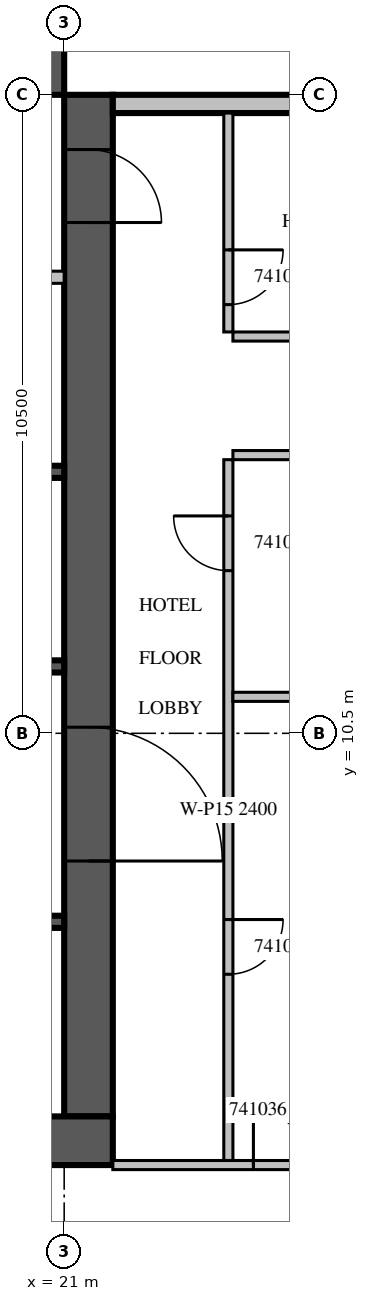
"""IFC4 building model, lengths in metres.
Left out: names, types, materials, properties, quantities, classifications, styles, units other than length and angle.
Written with IfcOpenShell. Run it as: python <this file> out.ifc"""

import sys

from ifc_helpers import new_model, si_unit, direction, frame, frame_2d, origin, place, context, subcontext, project, spatial, rectangle, extrude, source, transform, mapped, element, fill, save


model = new_model("IFC4")
c1 = context("Model", 3, precision=1e-05, world=origin(), true_north=direction((0.0, 1.0)))
c2 = subcontext(c1, "Body", "Model", "MODEL_VIEW")
j1 = project(units=[si_unit("LENGTHUNIT", "METRE"), si_unit("PLANEANGLEUNIT", "RADIAN")], contexts=[c1])
p1 = place(None, origin())
s1 = spatial("IfcSite", under=j1, at=p1, CompositionType="ELEMENT")
p2 = place(p1, origin())
s2 = spatial("IfcBuilding", under=s1, at=p2, CompositionType="ELEMENT")
p3 = place(p2, frame((0.0, 0.0, 189.2)))
s3 = spatial("IfcBuildingStorey", under=s2, at=p3, CompositionType="ELEMENT", Elevation=189.2)
m1 = source(origin(), c2, "Body", "SweptSolid", [
    extrude(rectangle(XDim=16.8, YDim=0.8, at=frame_2d((8.4, 0.0))), origin(), (0.0, 0.0, 1.0), 3.8),
])
p4 = place(p3, frame((21.4, 4.2, 0.0), z_axis=(0.0, 0.0, 1.0), x_axis=(0.0, 1.0, 0.0)))
e1 = element("IfcWall", 1, at=p4, inside=s3, PredefinedType="SHEAR", context=c2, shape_type="MappedRepresentation", body=[
    mapped(m1, transform((0.0, 0.0, 0.0), scale=1.0)),
])
m2 = source(origin(), c2, "Body", "SweptSolid", [
    extrude(rectangle(XDim=2.2, YDim=2.1, at=frame_2d((1.1, 1.05))), frame((0.0, 0.41, 0.0), z_axis=(0.0, -1.0, 0.0), x_axis=(1.0, 0.0, 0.0)), (0.0, 0.0, 1.0), 0.82),
])
p5 = place(p4, frame((4.2, 0.0, 0.0)))
e2 = element("IfcOpeningElement", 2, at=p5, cuts=e1, PredefinedType="OPENING", context=c2, shape_type="MappedRepresentation", body=[
    mapped(m2, transform((0.0, 0.0, 0.0), scale=1.0)),
])
m3 = source(origin(), c2, "Body", "SweptSolid", [
    extrude(rectangle(XDim=1.2, YDim=2.1, at=frame_2d((0.6, 1.05))), frame((0.0, 0.41, 0.0), z_axis=(0.0, -1.0, 0.0), x_axis=(1.0, 0.0, 0.0)), (0.0, 0.0, 1.0), 0.82),
])
p6 = place(p4, frame((14.7, 0.0, 0.0)))
e3 = element("IfcOpeningElement", 3, at=p6, cuts=e1, PredefinedType="OPENING", context=c2, shape_type="MappedRepresentation", body=[
    mapped(m3, transform((0.0, 0.0, 0.0), scale=1.0)),
])
m4 = source(origin(), c2, "Body", "SweptSolid", [
    extrude(rectangle(XDim=17.6, YDim=0.8, at=frame_2d((8.8, 0.0))), origin(), (0.0, 0.0, 1.0), 3.8),
])
p7 = place(p3, frame((4.2, 3.8, 0.0), z_axis=(0.0, 0.0, 1.0), x_axis=(1.0, 0.0, 0.0)))
e4 = element("IfcWall", 4, at=p7, inside=s3, PredefinedType="SHEAR", context=c2, shape_type="MappedRepresentation", body=[
    mapped(m4, transform((0.0, 0.0, 0.0), scale=1.0)),
])
m5 = source(origin(), c2, "Body", "SweptSolid", [
    extrude(rectangle(XDim=0.9, YDim=2.1, at=frame_2d((0.45, 1.05))), frame((0.0, 0.41, 0.0), z_axis=(0.0, -1.0, 0.0), x_axis=(1.0, 0.0, 0.0)), (0.0, 0.0, 1.0), 0.82),
])
p8 = place(p7, frame((11.55, 0.0, 0.0)))
e5 = element("IfcOpeningElement", 5, at=p8, cuts=e4, PredefinedType="OPENING", context=c2, shape_type="MappedRepresentation", body=[
    mapped(m5, transform((0.0, 0.0, 0.0), scale=1.0)),
])
p9 = place(p3, frame((4.2, 21.4, 0.0), z_axis=(0.0, 0.0, 1.0), x_axis=(1.0, 0.0, 0.0)))
e6 = element("IfcWall", 6, at=p9, inside=s3, PredefinedType="SHEAR", context=c2, shape_type="MappedRepresentation", body=[
    mapped(m1, transform((0.0, 0.0, 0.0), scale=1.0)),
])
p10 = place(p9, frame((7.4, 0.0, 0.0)))
e7 = element("IfcOpeningElement", 7, at=p10, cuts=e6, PredefinedType="OPENING", context=c2, shape_type="MappedRepresentation", body=[
    mapped(m3, transform((0.0, 0.0, 0.0), scale=1.0)),
])
m6 = source(origin(), c2, "Body", "SweptSolid", [
    extrude(rectangle(XDim=7.15, YDim=0.3, at=frame_2d((3.575, 0.0))), origin(), (0.0, 0.0, 1.0), 3.4),
])
p11 = place(p3, frame((28.95, 20.85, 0.0), z_axis=(0.0, 0.0, 1.0), x_axis=(-1.0, 0.0, 0.0)))
e8 = element("IfcWall", 8, at=p11, inside=s3, PredefinedType="STANDARD", context=c2, shape_type="MappedRepresentation", body=[
    mapped(m6, transform((0.0, 0.0, 0.0), scale=1.0)),
])
m7 = source(origin(), c2, "Body", "SweptSolid", [
    extrude(rectangle(XDim=3.0, YDim=2.3, at=frame_2d((1.5, 1.15))), frame((0.0, 0.16, 0.0), z_axis=(0.0, -1.0, 0.0), x_axis=(1.0, 0.0, 0.0)), (0.0, 0.0, 1.0), 0.32),
])
p12 = place(p11, frame((0.15, 0.0, 0.6)))
e9 = element("IfcOpeningElement", 9, at=p12, cuts=e8, PredefinedType="OPENING", context=c2, shape_type="MappedRepresentation", body=[
    mapped(m7, transform((0.0, 0.0, 0.0), scale=1.0)),
])
m8 = source(origin(), c2, "Body", "SweptSolid", [
    extrude(rectangle(XDim=2.4, YDim=0.2, at=frame_2d((1.2, 0.0))), origin(), (0.0, 0.0, 1.0), 3.8),
])
p13 = place(p3, frame((18.6, 7.4, 0.0), z_axis=(0.0, 0.0, 1.0), x_axis=(1.0, 0.0, 0.0)))
e10 = element("IfcWall", 10, at=p13, inside=s3, PredefinedType="SOLIDWALL", context=c2, shape_type="MappedRepresentation", body=[
    mapped(m8, transform((0.0, 0.0, 0.0), scale=1.0)),
])
m9 = source(origin(), c2, "Body", "SweptSolid", [
    extrude(rectangle(XDim=9.6, YDim=0.2, at=frame_2d((4.8, 0.0))), origin(), (0.0, 0.0, 1.0), 3.8),
])
p14 = place(p3, frame((11.4, 11.6, 0.0), z_axis=(0.0, 0.0, 1.0), x_axis=(1.0, 0.0, 0.0)))
e11 = element("IfcWall", 11, at=p14, inside=s3, PredefinedType="SOLIDWALL", context=c2, shape_type="MappedRepresentation", body=[
    mapped(m9, transform((0.0, 0.0, 0.0), scale=1.0)),
])
p15 = place(p3, frame((11.4, 14.8, 0.0), z_axis=(0.0, 0.0, 1.0), x_axis=(1.0, 0.0, 0.0)))
e12 = element("IfcWall", 12, at=p15, inside=s3, PredefinedType="SOLIDWALL", context=c2, shape_type="MappedRepresentation", body=[
    mapped(m9, transform((0.0, 0.0, 0.0), scale=1.0)),
])
m10 = source(origin(), c2, "Body", "SweptSolid", [
    extrude(rectangle(XDim=1.1, YDim=2.1, at=frame_2d((0.55, 1.05))), frame((0.0, 0.11, 0.0), z_axis=(0.0, -1.0, 0.0), x_axis=(1.0, 0.0, 0.0)), (0.0, 0.0, 1.0), 0.22),
])
p16 = place(p15, frame((3.05, 0.0, 0.0)))
e13 = element("IfcOpeningElement", 13, at=p16, cuts=e12, PredefinedType="OPENING", context=c2, shape_type="MappedRepresentation", body=[
    mapped(m10, transform((0.0, 0.0, 0.0), scale=1.0)),
])
p17 = place(p15, frame((5.45, 0.0, 0.0)))
e14 = element("IfcOpeningElement", 14, at=p17, cuts=e12, PredefinedType="OPENING", context=c2, shape_type="MappedRepresentation", body=[
    mapped(m10, transform((0.0, 0.0, 0.0), scale=1.0)),
])
p18 = place(p15, frame((7.85, 0.0, 0.0)))
e15 = element("IfcOpeningElement", 15, at=p18, cuts=e12, PredefinedType="OPENING", context=c2, shape_type="MappedRepresentation", body=[
    mapped(m10, transform((0.0, 0.0, 0.0), scale=1.0)),
])
m11 = source(origin(), c2, "Body", "SweptSolid", [
    extrude(rectangle(XDim=11.45, YDim=0.2, at=frame_2d((5.725, 0.0))), origin(), (0.0, 0.0, 1.0), 3.4),
])
p19 = place(p3, frame((9.55, 18.0, 0.0), z_axis=(0.0, 0.0, 1.0), x_axis=(1.0, 0.0, 0.0)))
e16 = element("IfcWall", 16, at=p19, inside=s3, PredefinedType="PARTITIONING", context=c2, shape_type="MappedRepresentation", body=[
    mapped(m11, transform((0.0, 0.0, 0.0), scale=1.0)),
])
m12 = source(origin(), c2, "Body", "SweptSolid", [
    extrude(rectangle(XDim=0.9, YDim=2.1, at=frame_2d((0.45, 1.05))), frame((0.0, 0.11, 0.0), z_axis=(0.0, -1.0, 0.0), x_axis=(1.0, 0.0, 0.0)), (0.0, 0.0, 1.0), 0.22),
])
p20 = place(p19, frame((1.075, 0.0, 0.0)))
e17 = element("IfcOpeningElement", 17, at=p20, cuts=e16, PredefinedType="OPENING", context=c2, shape_type="MappedRepresentation", body=[
    mapped(m12, transform((0.0, 0.0, 0.0), scale=1.0)),
])
p21 = place(p19, frame((3.125, 0.0, 0.0)))
e18 = element("IfcOpeningElement", 18, at=p21, cuts=e16, PredefinedType="OPENING", context=c2, shape_type="MappedRepresentation", body=[
    mapped(m12, transform((0.0, 0.0, 0.0), scale=1.0)),
])
p22 = place(p19, frame((7.35, 0.0, 0.0)))
e19 = element("IfcOpeningElement", 19, at=p22, cuts=e16, PredefinedType="OPENING", context=c2, shape_type="MappedRepresentation", body=[
    mapped(m10, transform((0.0, 0.0, 0.0), scale=1.0)),
])
m13 = source(origin(), c2, "Body", "SweptSolid", [
    extrude(rectangle(XDim=11.525, YDim=0.15, at=frame_2d((5.763, 0.0))), origin(), (0.0, 0.0, 1.0), 2.4),
])
p23 = place(p3, frame((23.7, 15.0, 0.0), z_axis=(0.0, 0.0, 1.0), x_axis=(0.0, -1.0, 0.0)))
e20 = element("IfcWall", 20, at=p23, inside=s3, PredefinedType="PARTITIONING", context=c2, shape_type="MappedRepresentation", body=[
    mapped(m13, transform((0.0, 0.0, 0.0), scale=1.0)),
])
m14 = source(origin(), c2, "Body", "SweptSolid", [
    extrude(rectangle(XDim=0.9, YDim=2.1, at=frame_2d((0.45, 1.05))), frame((0.0, 0.085, 0.0), z_axis=(0.0, -1.0, 0.0), x_axis=(1.0, 0.0, 0.0)), (0.0, 0.0, 1.0), 0.17),
])
p24 = place(p23, frame((7.562, 0.0, 0.0)))
e21 = element("IfcOpeningElement", 21, at=p24, cuts=e20, PredefinedType="OPENING", context=c2, shape_type="MappedRepresentation", body=[
    mapped(m14, transform((0.0, 0.0, 0.0), scale=1.0)),
])
p25 = place(p23, frame((0.925, 0.0, 0.0)))
e22 = element("IfcOpeningElement", 22, at=p25, cuts=e20, PredefinedType="OPENING", context=c2, shape_type="MappedRepresentation", body=[
    mapped(m14, transform((0.0, 0.0, 0.0), scale=1.0)),
])
m15 = source(origin(), c2, "Body", "SweptSolid", [
    extrude(rectangle(XDim=3.6, YDim=0.15, at=frame_2d((1.8, 0.0))), origin(), (0.0, 0.0, 1.0), 3.4),
])
p26 = place(p3, frame((23.7, 20.7, 0.0), z_axis=(0.0, 0.0, 1.0), x_axis=(0.0, -1.0, 0.0)))
e23 = element("IfcWall", 23, at=p26, inside=s3, PredefinedType="PARTITIONING", context=c2, shape_type="MappedRepresentation", body=[
    mapped(m15, transform((0.0, 0.0, 0.0), scale=1.0)),
])
p27 = place(p26, frame((2.25, 0.0, 0.0)))
e24 = element("IfcOpeningElement", 24, at=p27, cuts=e23, PredefinedType="OPENING", context=c2, shape_type="MappedRepresentation", body=[
    mapped(m14, transform((0.0, 0.0, 0.0), scale=1.0)),
])
m16 = source(origin(), c2, "Body", "SweptSolid", [
    extrude(rectangle(XDim=5.55, YDim=0.15, at=frame_2d((2.775, 0.0))), origin(), (0.0, 0.0, 1.0), 3.4),
])
for number, where, z_axis, x_axis in (
    (25, (29.325, 11.1, 0.0), (0.0, 0.0, 1.0), (-1.0, 0.0, 0.0)),
    (26, (29.325, 15.075, 0.0), (0.0, 0.0, 1.0), (-1.0, 0.0, 0.0)),
    (27, (23.775, 17.025, 0.0), (0.0, 0.0, 1.0), (1.0, 0.0, 0.0)),
):
    element("IfcWall", number, at=place(p3, frame(where, z_axis=z_axis, x_axis=x_axis)), inside=s3, PredefinedType="PARTITIONING", context=c2, shape_type="MappedRepresentation", body=[
        mapped(m16, transform((0.0, 0.0, 0.0), scale=1.0)),
    ])
m17 = source(origin(), c2, "Body", "SweptSolid", [
    extrude(rectangle(XDim=7.525, YDim=0.15, at=frame_2d((3.763, 0.0))), origin(), (0.0, 0.0, 1.0), 2.9),
])
p28 = place(p3, frame((21.8, 3.4, 0.0), z_axis=(0.0, 0.0, 1.0), x_axis=(1.0, 0.0, 0.0)))
e28 = element("IfcWall", 28, at=p28, inside=s3, PredefinedType="PARTITIONING", context=c2, shape_type="MappedRepresentation", body=[
    mapped(m17, transform((0.0, 0.0, 0.0), scale=1.0)),
])
m18 = source(origin(), c2, "Body", "SweptSolid", [
    extrude(rectangle(XDim=1.0, YDim=2.1, at=frame_2d((0.5, 1.05))), frame((0.0, 0.085, 0.0), z_axis=(0.0, -1.0, 0.0), x_axis=(1.0, 0.0, 0.0)), (0.0, 0.0, 1.0), 0.17),
])
p29 = place(p28, frame((3.3, 0.0, 0.0)))
e29 = element("IfcOpeningElement", 29, at=p29, cuts=e28, PredefinedType="OPENING", context=c2, shape_type="MappedRepresentation", body=[
    mapped(m18, transform((0.0, 0.0, 0.0), scale=1.0)),
])
p30 = place(p28, frame((2.312, 0.0, 0.0)))
e30 = element("IfcOpeningElement", 30, at=p30, cuts=e28, PredefinedType="OPENING", context=c2, shape_type="MappedRepresentation", body=[
    mapped(m14, transform((0.0, 0.0, 0.0), scale=1.0)),
])
m19 = source(origin(), c2, "Body", "SweptSolid", [
    extrude(rectangle(XDim=2.2, YDim=2.1, at=frame_2d((1.1, 1.05))), frame((0.0, 0.025, 0.0), z_axis=(0.0, -1.0, 0.0), x_axis=(1.0, 0.0, 0.0)), (0.0, 0.0, 1.0), 0.05),
])
p31 = place(p5, origin())
e31 = element("IfcDoor", 31, at=p31, inside=s3, OperationType="DOUBLE_DOOR_SINGLE_SWING", PredefinedType="DOOR", context=c2, shape_type="MappedRepresentation", body=[
    mapped(m19, transform((0.0, 0.0, 0.0), scale=1.0)),
])
fill(e2, e31)
m20 = source(origin(), c2, "Body", "SweptSolid", [
    extrude(rectangle(XDim=1.2, YDim=2.1, at=frame_2d((0.6, 1.05))), frame((0.0, 0.025, 0.0), z_axis=(0.0, -1.0, 0.0), x_axis=(1.0, 0.0, 0.0)), (0.0, 0.0, 1.0), 0.05),
])
p32 = place(p6, origin())
e32 = element("IfcDoor", 32, at=p32, inside=s3, OperationType="SINGLE_SWING_RIGHT", PredefinedType="DOOR", context=c2, shape_type="MappedRepresentation", body=[
    mapped(m20, transform((0.0, 0.0, 0.0), scale=1.0)),
])
fill(e3, e32)
m21 = source(origin(), c2, "Body", "SweptSolid", [
    extrude(rectangle(XDim=0.9, YDim=2.1, at=frame_2d((0.45, 1.05))), frame((0.0, 0.025, 0.0), z_axis=(0.0, -1.0, 0.0), x_axis=(1.0, 0.0, 0.0)), (0.0, 0.0, 1.0), 0.05),
])
p33 = place(p24, origin())
e33 = element("IfcDoor", 33, at=p33, inside=s3, OperationType="SINGLE_SWING_LEFT", PredefinedType="DOOR", context=c2, shape_type="MappedRepresentation", body=[
    mapped(m21, transform((0.0, 0.0, 0.0), scale=1.0)),
])
fill(e21, e33)
p34 = place(p25, origin())
e34 = element("IfcDoor", 34, at=p34, inside=s3, OperationType="SINGLE_SWING_RIGHT", PredefinedType="DOOR", context=c2, shape_type="MappedRepresentation", body=[
    mapped(m21, transform((0.0, 0.0, 0.0), scale=1.0)),
])
fill(e22, e34)
p35 = place(p27, origin())
e35 = element("IfcDoor", 35, at=p35, inside=s3, OperationType="SINGLE_SWING_LEFT", PredefinedType="DOOR", context=c2, shape_type="MappedRepresentation", body=[
    mapped(m21, transform((0.0, 0.0, 0.0), scale=1.0)),
])
fill(e24, e35)
p36 = place(p30, origin())
e36 = element("IfcDoor", 36, at=p36, inside=s3, OperationType="SINGLE_SWING_LEFT", PredefinedType="DOOR", context=c2, shape_type="MappedRepresentation", body=[
    mapped(m21, transform((0.0, 0.0, 0.0), scale=1.0)),
])
fill(e30, e36)
save(model, sys.argv[1])
